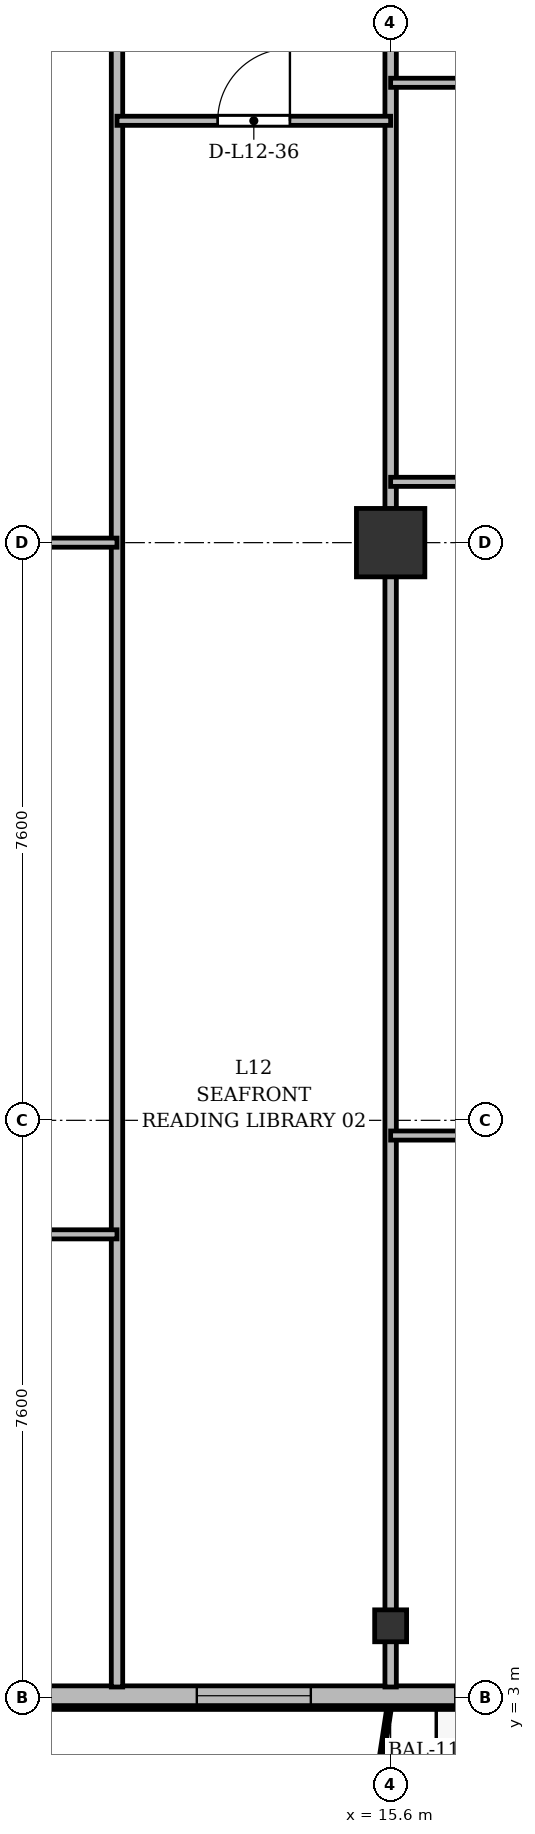
"""IFC4 building model, lengths in metres.
Left out: names, types, materials, properties, quantities, classifications, styles, units other than length and angle.
Written with IfcOpenShell. Run it as: python <this file> out.ifc"""

import sys

from ifc_helpers import new_model, si_unit, direction, frame, frame_2d, origin, origin_2d, place, context, subcontext, project, spatial, rectangle, i_section, extrude, source, transform, mapped, element, fill, save


model = new_model("IFC4")
c1 = context("Model", 3, precision=1e-05, world=origin(), true_north=direction((0.0, 1.0)))
c2 = subcontext(c1, "Body", "Model", "MODEL_VIEW")
j1 = project(units=[si_unit("LENGTHUNIT", "METRE"), si_unit("PLANEANGLEUNIT", "RADIAN")], contexts=[c1])
p1 = place(None, origin())
s1 = spatial("IfcSite", under=j1, at=p1, CompositionType="ELEMENT")
p2 = place(p1, origin())
s2 = spatial("IfcBuilding", under=s1, at=p2, CompositionType="ELEMENT")
p3 = place(p2, frame((0.0, 0.0, 48.7)))
s3 = spatial("IfcBuildingStorey", under=s2, at=p3, CompositionType="ELEMENT", Elevation=48.7)
m1 = source(origin(), c2, "Body", "SweptSolid", [
    extrude(i_section(OverallWidth=0.42, OverallDepth=0.42, WebThickness=0.026, FlangeThickness=0.04, at=origin_2d()), origin(), (0.0, 0.0, 1.0), 3.6),
])
p4 = place(p3, frame((15.6, 3.95, 0.0), z_axis=(0.0, 0.0, 1.0), x_axis=(1.0, 0.0, 0.0)))
e1 = element("IfcColumn", 1, at=p4, inside=s3, PredefinedType="COLUMN", context=c2, shape_type="MappedRepresentation", body=[
    mapped(m1, transform((0.0, 0.0, 0.0), x_axis=(1.0, 0.0, 0.0), y_axis=(0.0, 1.0, 0.0), z_axis=(0.0, 0.0, 1.0), scale=1.0)),
])
m2 = source(origin(), c2, "Body", "SweptSolid", [
    extrude(rectangle(XDim=0.9, YDim=0.9, at=origin_2d()), origin(), (0.0, 0.0, 1.0), 3.6),
])
p5 = place(p3, frame((15.6, 18.2, 0.0), z_axis=(0.0, 0.0, 1.0), x_axis=(1.0, 0.0, 0.0)))
e2 = element("IfcColumn", 2, at=p5, inside=s3, PredefinedType="COLUMN", context=c2, shape_type="MappedRepresentation", body=[
    mapped(m2, transform((0.0, 0.0, 0.0), x_axis=(1.0, 0.0, 0.0), y_axis=(0.0, 1.0, 0.0), z_axis=(0.0, 0.0, 1.0), scale=1.0)),
])
p6 = place(p3, frame((66.9, 3.03, 0.0), z_axis=(0.0, 0.0, 1.0), x_axis=(-1.0, 0.0, 0.0)))
e3 = element("IfcWall", 3, at=p6, inside=s3, PredefinedType="SOLIDWALL", context=c2, shape_type="SweptSolid", body=[
    extrude(rectangle(XDim=59.4, YDim=0.26, at=frame_2d((29.7, 0.0))), origin(), (0.0, 0.0, 1.0), 3.34),
])
p7 = place(p6, frame((0.745, 0.0, 0.9)))
e4 = element("IfcOpeningElement", 4, at=p7, cuts=e3, PredefinedType="OPENING", context=c2, shape_type="SweptSolid", body=[
    extrude(rectangle(XDim=1.5, YDim=1.75, at=frame_2d((0.75, 0.875))), frame((0.0, 0.14, 0.0), z_axis=(0.0, -1.0, 0.0), x_axis=(1.0, 0.0, 0.0)), (0.0, 0.0, 1.0), 0.28),
])
p8 = place(p6, frame((4.5, 0.0, 0.9)))
e5 = element("IfcOpeningElement", 5, at=p8, cuts=e3, PredefinedType="OPENING", context=c2, shape_type="SweptSolid", body=[
    extrude(rectangle(XDim=2.0, YDim=1.95, at=frame_2d((1.0, 0.975))), frame((0.0, 0.14, 0.0), z_axis=(0.0, -1.0, 0.0), x_axis=(1.0, 0.0, 0.0)), (0.0, 0.0, 1.0), 0.28),
])
p9 = place(p6, frame((11.175, 0.0, 0.9)))
e6 = element("IfcOpeningElement", 6, at=p9, cuts=e3, PredefinedType="OPENING", context=c2, shape_type="SweptSolid", body=[
    extrude(rectangle(XDim=1.65, YDim=1.85, at=frame_2d((0.825, 0.925))), frame((0.0, 0.14, 0.0), z_axis=(0.0, -1.0, 0.0), x_axis=(1.0, 0.0, 0.0)), (0.0, 0.0, 1.0), 0.28),
])
p10 = place(p6, frame((17.007, 0.0, 0.0)))
e7 = element("IfcOpeningElement", 7, at=p10, cuts=e3, PredefinedType="OPENING", context=c2, shape_type="SweptSolid", body=[
    extrude(rectangle(XDim=1.2, YDim=2.2, at=frame_2d((0.6, 1.1))), frame((0.0, 0.14, 0.0), z_axis=(0.0, -1.0, 0.0), x_axis=(1.0, 0.0, 0.0)), (0.0, 0.0, 1.0), 0.28),
])
p11 = place(p6, frame((20.2, 0.0, 0.9)))
e8 = element("IfcOpeningElement", 8, at=p11, cuts=e3, PredefinedType="OPENING", context=c2, shape_type="SweptSolid", body=[
    extrude(rectangle(XDim=2.2, YDim=1.8, at=frame_2d((1.1, 0.9))), frame((0.0, 0.14, 0.0), z_axis=(0.0, -1.0, 0.0), x_axis=(1.0, 0.0, 0.0)), (0.0, 0.0, 1.0), 0.28),
])
p12 = place(p6, frame((24.75, 0.0, 0.9)))
e9 = element("IfcOpeningElement", 9, at=p12, cuts=e3, PredefinedType="OPENING", context=c2, shape_type="SweptSolid", body=[
    extrude(rectangle(XDim=1.5, YDim=1.75, at=frame_2d((0.75, 0.875))), frame((0.0, 0.14, 0.0), z_axis=(0.0, -1.0, 0.0), x_axis=(1.0, 0.0, 0.0)), (0.0, 0.0, 1.0), 0.28),
])
p13 = place(p6, frame((31.1, 0.0, 0.9)))
e10 = element("IfcOpeningElement", 10, at=p13, cuts=e3, PredefinedType="OPENING", context=c2, shape_type="SweptSolid", body=[
    extrude(rectangle(XDim=2.0, YDim=1.95, at=frame_2d((1.0, 0.975))), frame((0.0, 0.14, 0.0), z_axis=(0.0, -1.0, 0.0), x_axis=(1.0, 0.0, 0.0)), (0.0, 0.0, 1.0), 0.28),
])
p14 = place(p6, frame((39.075, 0.0, 0.9)))
e11 = element("IfcOpeningElement", 11, at=p14, cuts=e3, PredefinedType="OPENING", context=c2, shape_type="SweptSolid", body=[
    extrude(rectangle(XDim=1.65, YDim=1.85, at=frame_2d((0.825, 0.925))), frame((0.0, 0.14, 0.0), z_axis=(0.0, -1.0, 0.0), x_axis=(1.0, 0.0, 0.0)), (0.0, 0.0, 1.0), 0.28),
])
p15 = place(p6, frame((45.435, 0.0, 0.0)))
e12 = element("IfcOpeningElement", 12, at=p15, cuts=e3, PredefinedType="OPENING", context=c2, shape_type="SweptSolid", body=[
    extrude(rectangle(XDim=1.2, YDim=2.2, at=frame_2d((0.6, 1.1))), frame((0.0, 0.14, 0.0), z_axis=(0.0, -1.0, 0.0), x_axis=(1.0, 0.0, 0.0)), (0.0, 0.0, 1.0), 0.28),
])
p16 = place(p6, frame((48.25, 0.0, 0.9)))
e13 = element("IfcOpeningElement", 13, at=p16, cuts=e3, PredefinedType="OPENING", context=c2, shape_type="SweptSolid", body=[
    extrude(rectangle(XDim=2.2, YDim=1.8, at=frame_2d((1.1, 0.9))), frame((0.0, 0.14, 0.0), z_axis=(0.0, -1.0, 0.0), x_axis=(1.0, 0.0, 0.0)), (0.0, 0.0, 1.0), 0.28),
])
p17 = place(p6, frame((52.35, 0.0, 0.9)))
e14 = element("IfcOpeningElement", 14, at=p17, cuts=e3, PredefinedType="OPENING", context=c2, shape_type="SweptSolid", body=[
    extrude(rectangle(XDim=1.5, YDim=1.75, at=frame_2d((0.75, 0.875))), frame((0.0, 0.14, 0.0), z_axis=(0.0, -1.0, 0.0), x_axis=(1.0, 0.0, 0.0)), (0.0, 0.0, 1.0), 0.28),
])
p18 = place(p6, frame((56.105, 0.0, 0.9)))
e15 = element("IfcOpeningElement", 15, at=p18, cuts=e3, PredefinedType="OPENING", context=c2, shape_type="SweptSolid", body=[
    extrude(rectangle(XDim=2.0, YDim=1.95, at=frame_2d((1.0, 0.975))), frame((0.0, 0.14, 0.0), z_axis=(0.0, -1.0, 0.0), x_axis=(1.0, 0.0, 0.0)), (0.0, 0.0, 1.0), 0.28),
])
p19 = place(p3, frame((12.0, 3.145, 0.0), z_axis=(0.0, 0.0, 1.0), x_axis=(0.0, 1.0, 0.0)))
e16 = element("IfcWall", 16, at=p19, inside=s3, PredefinedType="PARTITIONING", context=c2, shape_type="SweptSolid", body=[
    extrude(rectangle(XDim=24.455, YDim=0.15, at=frame_2d((12.228, 0.0))), origin(), (0.0, 0.0, 1.0), 2.69),
])
p20 = place(p3, frame((15.6, 3.145, 0.0), z_axis=(0.0, 0.0, 1.0), x_axis=(0.0, 1.0, 0.0)))
e17 = element("IfcWall", 17, at=p20, inside=s3, PredefinedType="PARTITIONING", context=c2, shape_type="SweptSolid", body=[
    extrude(rectangle(XDim=24.455, YDim=0.15, at=frame_2d((12.228, 0.0))), origin(), (0.0, 0.0, 1.0), 2.752),
])
p21 = place(p3, frame((4.76, 18.2, 0.0), z_axis=(0.0, 0.0, 1.0), x_axis=(1.0, 0.0, 0.0)))
e18 = element("IfcWall", 18, at=p21, inside=s3, PredefinedType="PARTITIONING", context=c2, shape_type="SweptSolid", body=[
    extrude(rectangle(XDim=7.24, YDim=0.12, at=frame_2d((3.62, 0.0))), origin(), (0.0, 0.0, 1.0), 2.69),
])
p22 = place(p21, frame((2.039, 0.0, 0.0)))
e19 = element("IfcOpeningElement", 19, at=p22, cuts=e18, PredefinedType="OPENING", context=c2, shape_type="SweptSolid", body=[
    extrude(rectangle(XDim=0.95, YDim=2.15, at=frame_2d((0.475, 1.075))), frame((0.0, 0.07, 0.0), z_axis=(0.0, -1.0, 0.0), x_axis=(1.0, 0.0, 0.0)), (0.0, 0.0, 1.0), 0.14),
])
p23 = place(p3, frame((4.76, 9.1, 0.0), z_axis=(0.0, 0.0, 1.0), x_axis=(1.0, 0.0, 0.0)))
e20 = element("IfcWall", 20, at=p23, inside=s3, PredefinedType="PARTITIONING", context=c2, shape_type="SweptSolid", body=[
    extrude(rectangle(XDim=7.24, YDim=0.12, at=frame_2d((3.62, 0.0))), origin(), (0.0, 0.0, 1.0), 2.752),
])
p24 = place(p23, frame((3.145, 0.0, 0.0)))
e21 = element("IfcOpeningElement", 21, at=p24, cuts=e20, PredefinedType="OPENING", context=c2, shape_type="SweptSolid", body=[
    extrude(rectangle(XDim=0.95, YDim=2.15, at=frame_2d((0.475, 1.075))), frame((0.0, 0.07, 0.0), z_axis=(0.0, -1.0, 0.0), x_axis=(1.0, 0.0, 0.0)), (0.0, 0.0, 1.0), 0.14),
])
p25 = place(p3, frame((12.0, 23.75, 0.0), z_axis=(0.0, 0.0, 1.0), x_axis=(1.0, 0.0, 0.0)))
e22 = element("IfcWall", 22, at=p25, inside=s3, PredefinedType="PARTITIONING", context=c2, shape_type="SweptSolid", body=[
    extrude(rectangle(XDim=3.6, YDim=0.12, at=frame_2d((1.8, 0.0))), origin(), (0.0, 0.0, 1.0), 2.752),
])
p26 = place(p25, frame((1.325, 0.0, 0.0)))
e23 = element("IfcOpeningElement", 23, at=p26, cuts=e22, PredefinedType="OPENING", context=c2, shape_type="SweptSolid", body=[
    extrude(rectangle(XDim=0.95, YDim=2.15, at=frame_2d((0.475, 1.075))), frame((0.0, 0.07, 0.0), z_axis=(0.0, -1.0, 0.0), x_axis=(1.0, 0.0, 0.0)), (0.0, 0.0, 1.0), 0.14),
])
p27 = place(p3, frame((15.6, 19.0, 0.0), z_axis=(0.0, 0.0, 1.0), x_axis=(1.0, 0.0, 0.0)))
e24 = element("IfcWall", 24, at=p27, inside=s3, PredefinedType="PARTITIONING", context=c2, shape_type="SweptSolid", body=[
    extrude(rectangle(XDim=7.8, YDim=0.12, at=frame_2d((3.9, 0.0))), origin(), (0.0, 0.0, 1.0), 2.752),
])
p28 = place(p27, frame((3.333, 0.0, 0.0)))
e25 = element("IfcOpeningElement", 25, at=p28, cuts=e24, PredefinedType="OPENING", context=c2, shape_type="SweptSolid", body=[
    extrude(rectangle(XDim=0.95, YDim=2.15, at=frame_2d((0.475, 1.075))), frame((0.0, 0.07, 0.0), z_axis=(0.0, -1.0, 0.0), x_axis=(1.0, 0.0, 0.0)), (0.0, 0.0, 1.0), 0.14),
])
p29 = place(p3, frame((15.6, 24.25, 0.0), z_axis=(0.0, 0.0, 1.0), x_axis=(1.0, 0.0, 0.0)))
e26 = element("IfcWall", 26, at=p29, inside=s3, PredefinedType="PARTITIONING", context=c2, shape_type="SweptSolid", body=[
    extrude(rectangle(XDim=2.4, YDim=0.12, at=frame_2d((1.2, 0.0))), origin(), (0.0, 0.0, 1.0), 2.752),
])
p30 = place(p3, frame((15.6, 10.4, 0.0), z_axis=(0.0, 0.0, 1.0), x_axis=(1.0, 0.0, 0.0)))
e27 = element("IfcWall", 27, at=p30, inside=s3, PredefinedType="PARTITIONING", context=c2, shape_type="SweptSolid", body=[
    extrude(rectangle(XDim=3.9, YDim=0.12, at=frame_2d((1.95, 0.0))), origin(), (0.0, 0.0, 1.0), 2.752),
])
p31 = place(p30, frame((1.475, 0.0, 0.0)))
e28 = element("IfcOpeningElement", 28, at=p31, cuts=e27, PredefinedType="OPENING", context=c2, shape_type="SweptSolid", body=[
    extrude(rectangle(XDim=0.95, YDim=2.15, at=frame_2d((0.475, 1.075))), frame((0.0, 0.07, 0.0), z_axis=(0.0, -1.0, 0.0), x_axis=(1.0, 0.0, 0.0)), (0.0, 0.0, 1.0), 0.14),
])
m3 = source(origin(), c2, "Body", "SweptSolid", [
    extrude(rectangle(XDim=2.2, YDim=1.8, at=frame_2d((1.1, 0.9))), frame((0.0, 0.03, 0.0), z_axis=(0.0, -1.0, 0.0), x_axis=(1.0, 0.0, 0.0)), (0.0, 0.0, 1.0), 0.06),
])
p32 = place(p16, origin())
e29 = element("IfcWindow", 29, at=p32, inside=s3, PartitioningType="SINGLE_PANEL", PredefinedType="WINDOW", context=c2, shape_type="MappedRepresentation", body=[
    mapped(m3, transform((0.0, 0.0, 0.0), x_axis=(1.0, 0.0, 0.0), y_axis=(0.0, 1.0, 0.0), z_axis=(0.0, 0.0, 1.0), scale=1.0)),
])
fill(e13, e29)
m4 = source(origin(), c2, "Body", "SweptSolid", [
    extrude(rectangle(XDim=1.5, YDim=1.75, at=frame_2d((0.75, 0.875))), frame((0.0, 0.03, 0.0), z_axis=(0.0, -1.0, 0.0), x_axis=(1.0, 0.0, 0.0)), (0.0, 0.0, 1.0), 0.06),
])
p33 = place(p17, origin())
e30 = element("IfcWindow", 30, at=p33, inside=s3, PartitioningType="SINGLE_PANEL", PredefinedType="WINDOW", context=c2, shape_type="MappedRepresentation", body=[
    mapped(m4, transform((0.0, 0.0, 0.0), x_axis=(1.0, 0.0, 0.0), y_axis=(0.0, 1.0, 0.0), z_axis=(0.0, 0.0, 1.0), scale=1.0)),
])
fill(e14, e30)
m5 = source(origin(), c2, "Body", "SweptSolid", [
    extrude(rectangle(XDim=0.95, YDim=2.15, at=frame_2d((0.475, 1.075))), frame((0.0, 0.025, 0.0), z_axis=(0.0, -1.0, 0.0), x_axis=(1.0, 0.0, 0.0)), (0.0, 0.0, 1.0), 0.05),
])
p34 = place(p26, origin())
e31 = element("IfcDoor", 31, at=p34, inside=s3, OperationType="SINGLE_SWING_RIGHT", PredefinedType="DOOR", context=c2, shape_type="MappedRepresentation", body=[
    mapped(m5, transform((0.0, 0.0, 0.0), x_axis=(1.0, 0.0, 0.0), y_axis=(0.0, 1.0, 0.0), z_axis=(0.0, 0.0, 1.0), scale=1.0)),
])
fill(e23, e31)
save(model, sys.argv[1])
